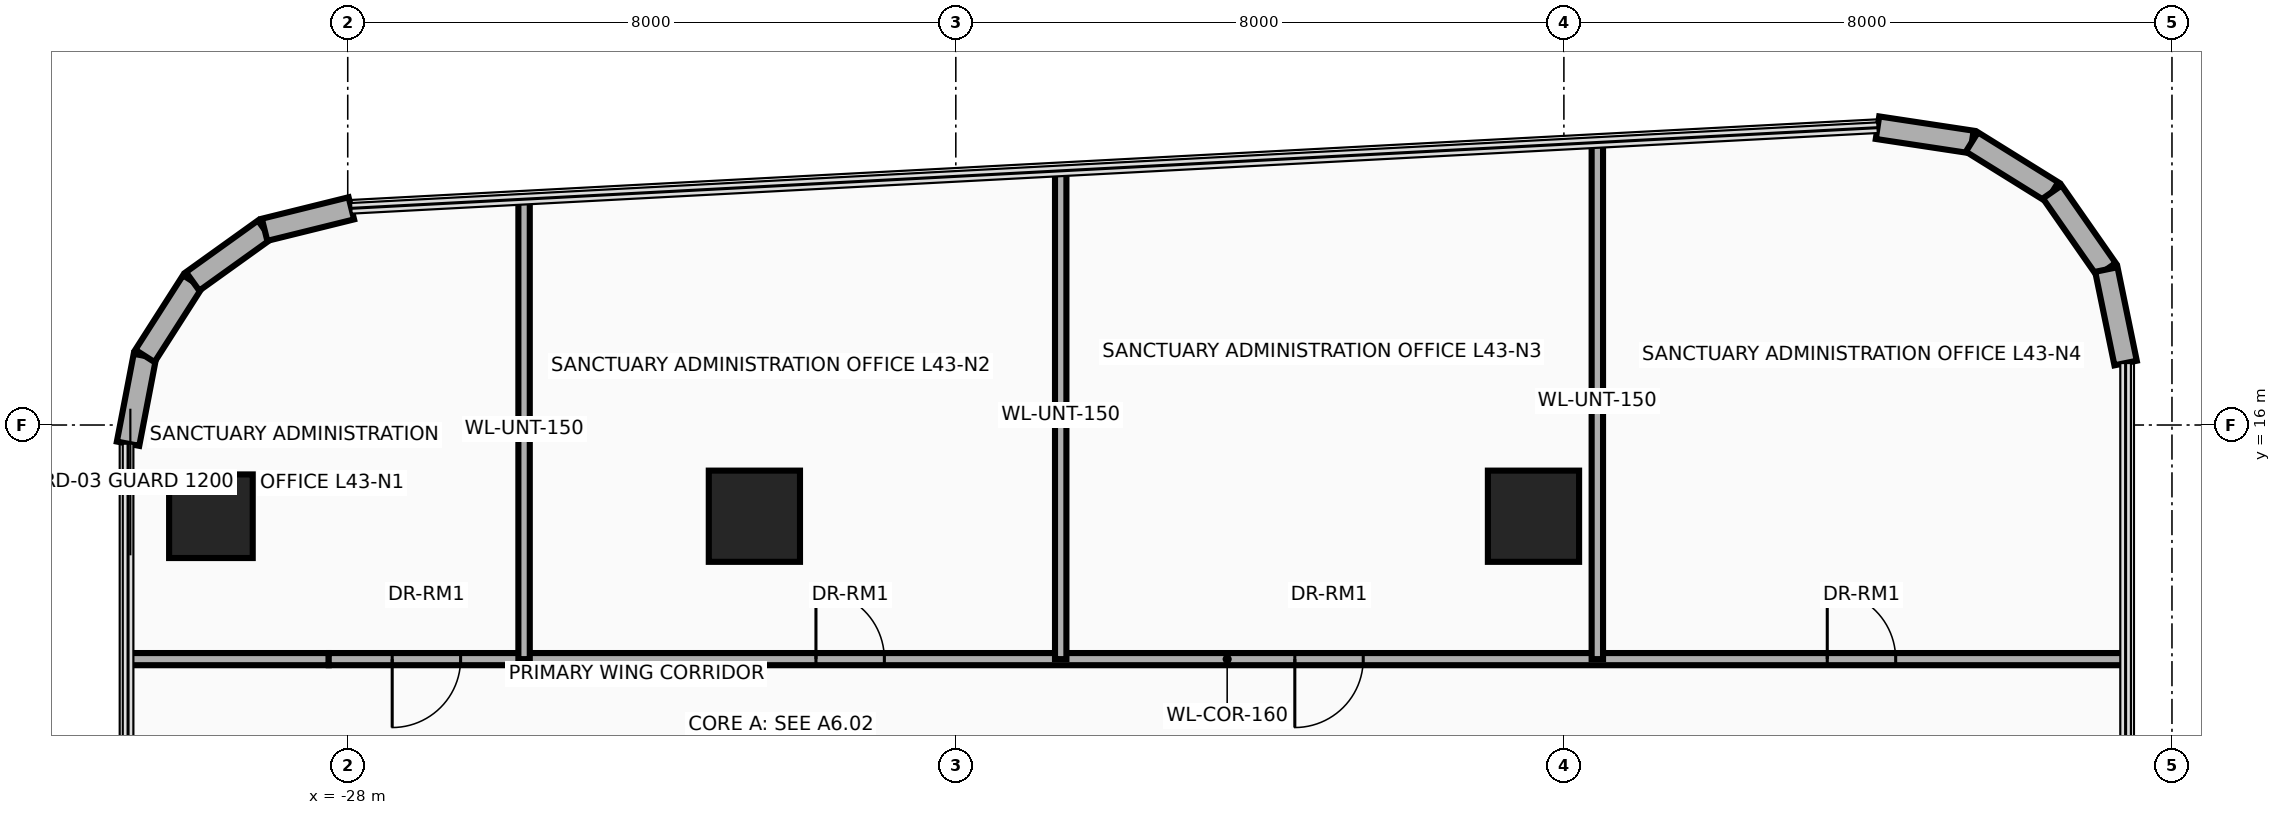
"""IFC4 building model, lengths in metres.
Left out: names, types, materials, properties, quantities, classifications, styles, units other than length and angle.
Written with IfcOpenShell. Run it as: python <this file> out.ifc"""

import sys

from ifc_helpers import new_model, si_unit, direction, frame, frame_2d, origin, origin_2d, place, context, subcontext, project, spatial, rectangle, circle, extrude, source, transform, mapped, element, fill, save


model = new_model("IFC4")
c1 = context("Model", 3, precision=1e-05, world=origin(), true_north=direction((0.0, 1.0)))
c2 = subcontext(c1, "Body", "Model", "MODEL_VIEW")
j1 = project(units=[si_unit("LENGTHUNIT", "METRE"), si_unit("PLANEANGLEUNIT", "RADIAN")], contexts=[c1])
p1 = place(None, origin())
s1 = spatial("IfcSite", under=j1, at=p1, CompositionType="ELEMENT")
p2 = place(p1, origin())
s2 = spatial("IfcBuilding", under=s1, at=p2, CompositionType="ELEMENT")
p3 = place(p2, frame((0.0, 0.0, 168.6)))
s3 = spatial("IfcBuildingStorey", under=s2, at=p3, CompositionType="ELEMENT", Elevation=168.6)
m1 = source(origin(), c2, "Body", "SweptSolid", [
    extrude(circle(Radius=0.55, at=origin_2d()), origin(), (0.0, 0.0, 1.0), 3.7),
])
p4 = place(p3, frame((-29.8, 14.8, 0.0), z_axis=(0.0, 0.0, 1.0), x_axis=(1.0, 0.0, 0.0)))
e1 = element("IfcColumn", 1, at=p4, inside=s3, PredefinedType="COLUMN", context=c2, shape_type="MappedRepresentation", body=[
    mapped(m1, transform((0.0, 0.0, 0.0), x_axis=(1.0, 0.0, 0.0), y_axis=(0.0, 1.0, 0.0), z_axis=(0.0, 0.0, 1.0), scale=1.0)),
])
m2 = source(origin(), c2, "Body", "SweptSolid", [
    extrude(rectangle(XDim=1.2, YDim=1.2, at=origin_2d()), origin(), (0.0, 0.0, 1.0), 3.7),
])
for number, where, z_axis, x_axis in (
    (2, (-22.65, 14.8, 0.0), (0.0, 0.0, 1.0), (1.0, 0.0, 0.0)),
    (3, (-12.4, 14.8, 0.0), (0.0, 0.0, 1.0), (1.0, 0.0, 0.0)),
):
    element("IfcColumn", number, at=place(p3, frame(where, z_axis=z_axis, x_axis=x_axis)), inside=s3, PredefinedType="COLUMN", context=c2, shape_type="MappedRepresentation", body=[
        mapped(m2, transform((0.0, 0.0, 0.0), x_axis=(1.0, 0.0, 0.0), y_axis=(0.0, 1.0, 0.0), z_axis=(0.0, 0.0, 1.0), scale=1.0)),
    ])
p5 = place(p3, frame((-30.89, 15.754, 0.0), z_axis=(0.0, 0.0, 1.0), x_axis=(0.188562397879, 0.982061210977, 0.0)))
e4 = element("IfcWall", 4, at=p5, inside=s3, PredefinedType="SOLIDWALL", context=c2, shape_type="SweptSolid", body=[
    extrude(rectangle(XDim=1.176, YDim=0.3, at=frame_2d((0.588, 0.0))), origin(), (0.0, 0.0, 1.0), 3.3),
])
for number, where, z_axis, x_axis in (
    (5, (-30.668, 16.909, 0.0), (0.0, 0.0, 1.0), (0.539, 0.842, 0.0)),
    (6, (-30.04, 17.89, 0.0), (0.0, 0.0, 1.0), (0.813, 0.583, 0.0)),
):
    element("IfcWall", number, at=place(p3, frame(where, z_axis=z_axis, x_axis=x_axis)), inside=s3, PredefinedType="SOLIDWALL", context=c2, shape_type="SweptSolid", body=[
        extrude(rectangle(XDim=1.165, YDim=0.3, at=frame_2d((0.583, 0.0))), origin(), (0.0, 0.0, 1.0), 3.3),
    ])
p6 = place(p3, frame((-29.094, 18.569, 0.0), z_axis=(0.0, 0.0, 1.0), x_axis=(0.970762249107, 0.24004302887, 0.0)))
e7 = element("IfcWall", 7, at=p6, inside=s3, PredefinedType="SOLIDWALL", context=c2, shape_type="SweptSolid", body=[
    extrude(rectangle(XDim=1.176, YDim=0.3, at=frame_2d((0.588, 0.0))), origin(), (0.0, 0.0, 1.0), 3.3),
])
p7 = place(p3, frame((-7.874, 19.912, 0.0), z_axis=(0.0, 0.0, 1.0), x_axis=(0.988741655411, -0.149632679769, 0.0)))
e8 = element("IfcWall", 8, at=p7, inside=s3, PredefinedType="SOLIDWALL", context=c2, shape_type="SweptSolid", body=[
    extrude(rectangle(XDim=1.256, YDim=0.3, at=frame_2d((0.628, 0.0))), origin(), (0.0, 0.0, 1.0), 3.3),
])
p8 = place(p3, frame((-6.632, 19.724, 0.0), z_axis=(0.0, 0.0, 1.0), x_axis=(0.849285325289, -0.527934121126, 0.0)))
e9 = element("IfcWall", 9, at=p8, inside=s3, PredefinedType="SOLIDWALL", context=c2, shape_type="SweptSolid", body=[
    extrude(rectangle(XDim=1.244, YDim=0.3, at=frame_2d((0.622, 0.0))), origin(), (0.0, 0.0, 1.0), 3.3),
])
p9 = place(p3, frame((-5.575, 19.067, 0.0), z_axis=(0.0, 0.0, 1.0), x_axis=(0.571960670617, -0.820281044074, 0.0)))
e10 = element("IfcWall", 10, at=p9, inside=s3, PredefinedType="SOLIDWALL", context=c2, shape_type="SweptSolid", body=[
    extrude(rectangle(XDim=1.245, YDim=0.3, at=frame_2d((0.622, 0.0))), origin(), (0.0, 0.0, 1.0), 3.3),
])
p10 = place(p3, frame((-4.863, 18.046, 0.0), z_axis=(0.0, 0.0, 1.0), x_axis=(0.201532282172, -0.97948187285, 0.0)))
e11 = element("IfcWall", 11, at=p10, inside=s3, PredefinedType="SOLIDWALL", context=c2, shape_type="SweptSolid", body=[
    extrude(rectangle(XDim=1.256, YDim=0.3, at=frame_2d((0.628, 0.0))), origin(), (0.0, 0.0, 1.0), 3.3),
])
p11 = place(p3, frame((-30.89, 12.92, 0.0), z_axis=(0.0, 0.0, 1.0), x_axis=(1.0, 0.0, 0.0)))
e12 = element("IfcWall", 12, at=p11, inside=s3, PredefinedType="PARTITIONING", context=c2, shape_type="SweptSolid", body=[
    extrude(rectangle(XDim=2.64, YDim=0.16, at=frame_2d((1.32, 0.0))), origin(), (0.0, 0.0, 1.0), 2.746),
])
p12 = place(p3, frame((-28.25, 12.92, 0.0), z_axis=(0.0, 0.0, 1.0), x_axis=(1.0, 0.0, 0.0)))
e13 = element("IfcWall", 13, at=p12, inside=s3, PredefinedType="PARTITIONING", context=c2, shape_type="SweptSolid", body=[
    extrude(rectangle(XDim=23.64, YDim=0.16, at=frame_2d((11.82, 0.0))), origin(), (0.0, 0.0, 1.0), 2.674),
])
p13 = place(p12, frame((0.835, 0.0, 0.0)))
e14 = element("IfcOpeningElement", 14, at=p13, cuts=e13, PredefinedType="OPENING", context=c2, shape_type="SweptSolid", body=[
    extrude(rectangle(XDim=0.9, YDim=2.1, at=frame_2d((0.45, 1.05))), frame((0.0, 0.095, 0.0), z_axis=(0.0, -1.0, 0.0), x_axis=(1.0, 0.0, 0.0)), (0.0, 0.0, 1.0), 0.19),
])
p14 = place(p12, frame((6.41, 0.0, 0.0)))
e15 = element("IfcOpeningElement", 15, at=p14, cuts=e13, PredefinedType="OPENING", context=c2, shape_type="SweptSolid", body=[
    extrude(rectangle(XDim=0.9, YDim=2.1, at=frame_2d((0.45, 1.05))), frame((0.0, 0.095, 0.0), z_axis=(0.0, -1.0, 0.0), x_axis=(1.0, 0.0, 0.0)), (0.0, 0.0, 1.0), 0.19),
])
p15 = place(p12, frame((12.71, 0.0, 0.0)))
e16 = element("IfcOpeningElement", 16, at=p15, cuts=e13, PredefinedType="OPENING", context=c2, shape_type="SweptSolid", body=[
    extrude(rectangle(XDim=0.9, YDim=2.1, at=frame_2d((0.45, 1.05))), frame((0.0, 0.095, 0.0), z_axis=(0.0, -1.0, 0.0), x_axis=(1.0, 0.0, 0.0)), (0.0, 0.0, 1.0), 0.19),
])
p16 = place(p12, frame((19.715, 0.0, 0.0)))
e17 = element("IfcOpeningElement", 17, at=p16, cuts=e13, PredefinedType="OPENING", context=c2, shape_type="SweptSolid", body=[
    extrude(rectangle(XDim=0.9, YDim=2.1, at=frame_2d((0.45, 1.05))), frame((0.0, 0.095, 0.0), z_axis=(0.0, -1.0, 0.0), x_axis=(1.0, 0.0, 0.0)), (0.0, 0.0, 1.0), 0.19),
])
p17 = place(p3, frame((-25.68, 12.92, 0.0), z_axis=(0.0, 0.0, 1.0), x_axis=(0.0, 1.0, 0.0)))
e18 = element("IfcWall", 18, at=p17, inside=s3, PredefinedType="PARTITIONING", context=c2, shape_type="SweptSolid", body=[
    extrude(rectangle(XDim=6.051, YDim=0.15, at=frame_2d((3.025, 0.0))), origin(), (0.0, 0.0, 1.0), 2.085),
])
p18 = place(p3, frame((-18.62, 12.92, 0.0), z_axis=(0.0, 0.0, 1.0), x_axis=(0.0, 1.0, 0.0)))
e19 = element("IfcWall", 19, at=p18, inside=s3, PredefinedType="PARTITIONING", context=c2, shape_type="SweptSolid", body=[
    extrude(rectangle(XDim=6.424, YDim=0.15, at=frame_2d((3.212, 0.0))), origin(), (0.0, 0.0, 1.0), 2.085),
])
p19 = place(p3, frame((-11.56, 12.92, 0.0), z_axis=(0.0, 0.0, 1.0), x_axis=(0.0, 1.0, 0.0)))
e20 = element("IfcWall", 20, at=p19, inside=s3, PredefinedType="PARTITIONING", context=c2, shape_type="SweptSolid", body=[
    extrude(rectangle(XDim=6.797, YDim=0.15, at=frame_2d((3.398, 0.0))), origin(), (0.0, 0.0, 1.0), 1.785),
])
p20 = place(p13, frame((0.9, 0.0, 0.0), z_axis=(0.0, 0.0, 1.0), x_axis=(-1.0, 0.0, 0.0)))
e21 = element("IfcDoor", 21, at=p20, inside=s3, OperationType="SINGLE_SWING_LEFT", PredefinedType="DOOR", context=c2, shape_type="SweptSolid", body=[
    extrude(rectangle(XDim=0.9, YDim=2.1, at=frame_2d((0.45, 1.05))), frame((0.0, 0.025, 0.0), z_axis=(0.0, -1.0, 0.0), x_axis=(1.0, 0.0, 0.0)), (0.0, 0.0, 1.0), 0.05),
])
fill(e14, e21)
p21 = place(p14, origin())
e22 = element("IfcDoor", 22, at=p21, inside=s3, OperationType="SINGLE_SWING_RIGHT", PredefinedType="DOOR", context=c2, shape_type="SweptSolid", body=[
    extrude(rectangle(XDim=0.9, YDim=2.1, at=frame_2d((0.45, 1.05))), frame((0.0, 0.025, 0.0), z_axis=(0.0, -1.0, 0.0), x_axis=(1.0, 0.0, 0.0)), (0.0, 0.0, 1.0), 0.05),
])
fill(e15, e22)
p22 = place(p15, frame((0.9, 0.0, 0.0), z_axis=(0.0, 0.0, 1.0), x_axis=(-1.0, 0.0, 0.0)))
e23 = element("IfcDoor", 23, at=p22, inside=s3, OperationType="SINGLE_SWING_LEFT", PredefinedType="DOOR", context=c2, shape_type="SweptSolid", body=[
    extrude(rectangle(XDim=0.9, YDim=2.1, at=frame_2d((0.45, 1.05))), frame((0.0, 0.025, 0.0), z_axis=(0.0, -1.0, 0.0), x_axis=(1.0, 0.0, 0.0)), (0.0, 0.0, 1.0), 0.05),
])
fill(e16, e23)
p23 = place(p16, origin())
e24 = element("IfcDoor", 24, at=p23, inside=s3, OperationType="SINGLE_SWING_RIGHT", PredefinedType="DOOR", context=c2, shape_type="SweptSolid", body=[
    extrude(rectangle(XDim=0.9, YDim=2.1, at=frame_2d((0.45, 1.05))), frame((0.0, 0.025, 0.0), z_axis=(0.0, -1.0, 0.0), x_axis=(1.0, 0.0, 0.0)), (0.0, 0.0, 1.0), 0.05),
])
fill(e17, e24)
save(model, sys.argv[1])
